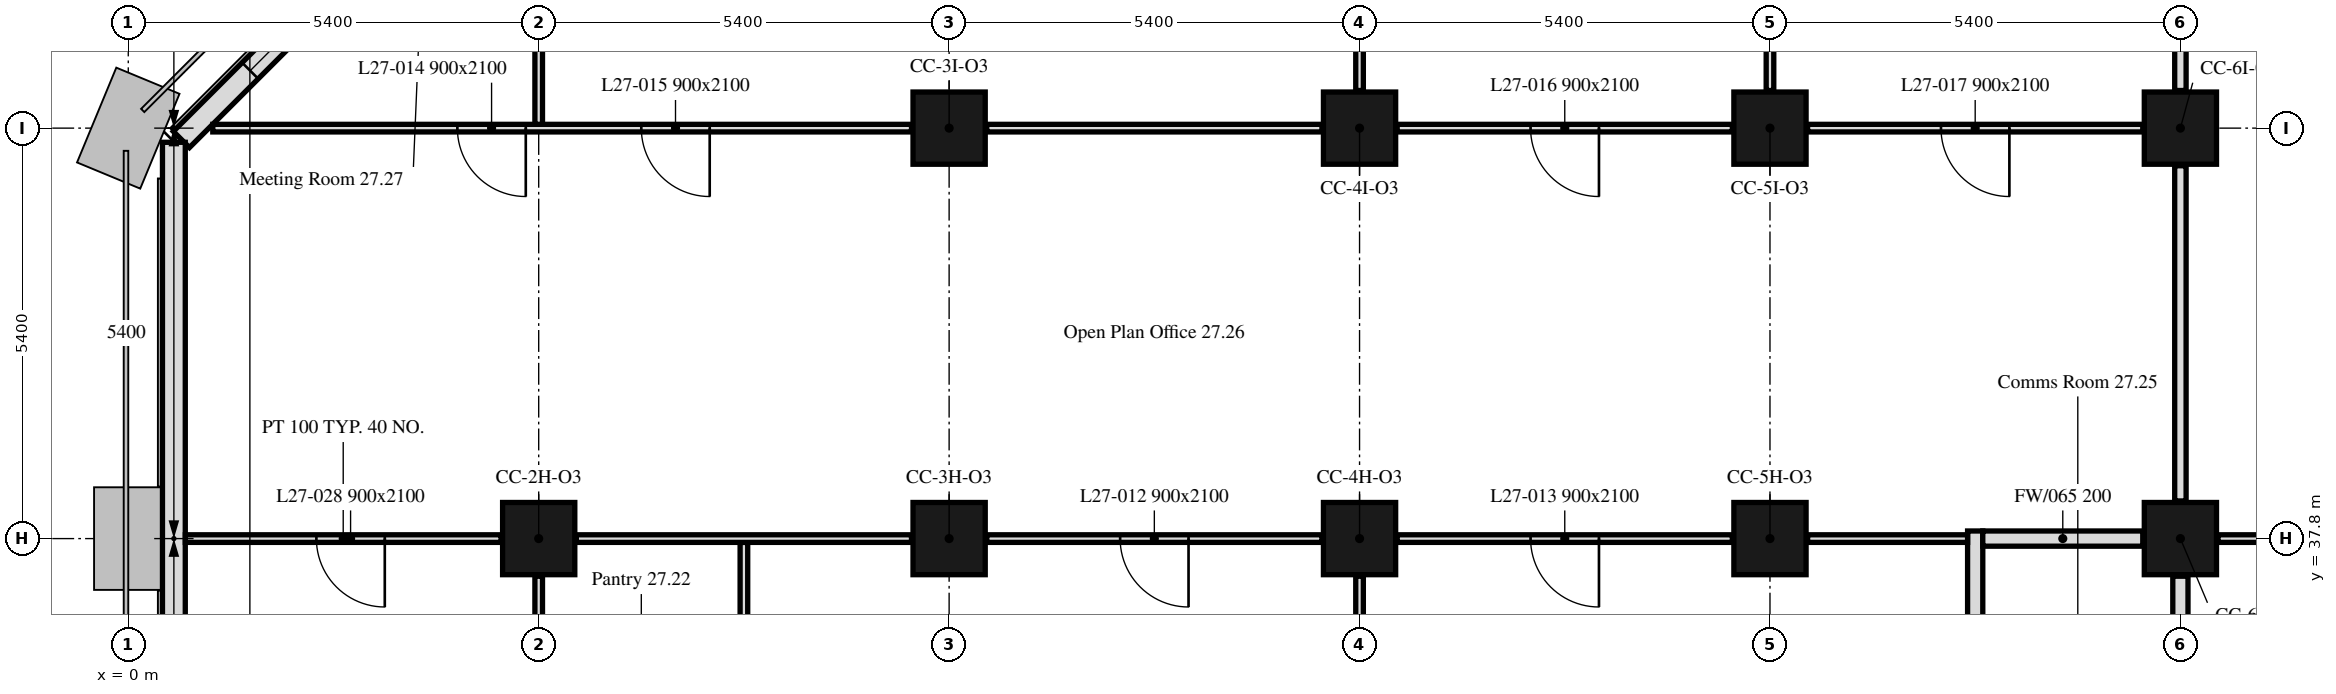
"""IFC4 building model, lengths in metres.
Left out: names, types, materials, properties, quantities, classifications, styles, units other than length and angle.
Written with IfcOpenShell. Run it as: python <this file> out.ifc"""

import sys

from ifc_helpers import new_model, si_unit, direction, frame, frame_2d, origin, origin_2d, place, context, subcontext, project, spatial, rectangle, extrude, element, fill, save


model = new_model("IFC4")
c1 = context("Model", 3, precision=1e-05, world=origin(), true_north=direction((0.0, 1.0)))
c2 = subcontext(c1, "Body", "Model", "MODEL_VIEW")
j1 = project(units=[si_unit("LENGTHUNIT", "METRE"), si_unit("PLANEANGLEUNIT", "RADIAN")], contexts=[c1])
p1 = place(None, origin())
s1 = spatial("IfcSite", under=j1, at=p1, CompositionType="ELEMENT")
p2 = place(p1, origin())
s2 = spatial("IfcBuilding", under=s1, at=p2, CompositionType="ELEMENT")
p3 = place(p2, frame((0.0, 0.0, 114.4)))
s3 = spatial("IfcBuildingStorey", under=s2, at=p3, CompositionType="ELEMENT", Elevation=114.4)
for number, where, z_axis, x_axis in (
    (1, (5.4, 37.8, 0.0), (0.0, 0.0, 1.0), (1.0, 0.0, 0.0)),
    (2, (10.8, 37.8, 0.0), (0.0, 0.0, 1.0), (1.0, 0.0, 0.0)),
    (3, (16.2, 37.8, 0.0), (0.0, 0.0, 1.0), (1.0, 0.0, 0.0)),
    (4, (21.6, 37.8, 0.0), (0.0, 0.0, 1.0), (1.0, 0.0, 0.0)),
    (5, (27.0, 37.8, 0.0), (0.0, 0.0, 1.0), (1.0, 0.0, 0.0)),
    (6, (10.8, 43.2, 0.0), (0.0, 0.0, 1.0), (1.0, 0.0, 0.0)),
    (7, (16.2, 43.2, 0.0), (0.0, 0.0, 1.0), (1.0, 0.0, 0.0)),
    (8, (21.6, 43.2, 0.0), (0.0, 0.0, 1.0), (1.0, 0.0, 0.0)),
    (9, (27.0, 43.2, 0.0), (0.0, 0.0, 1.0), (1.0, 0.0, 0.0)),
):
    element("IfcColumn", number, at=place(p3, frame(where, z_axis=z_axis, x_axis=x_axis)), inside=s3, PredefinedType="COLUMN", context=c2, shape_type="SweptSolid", body=[
        extrude(rectangle(XDim=0.95, YDim=0.95, at=origin_2d()), origin(), (0.0, 0.0, 1.0), 3.5),
    ])
p4 = place(p3, frame((5.55, 47.901, 0.0), z_axis=(0.0, 0.0, 1.0), x_axis=(-0.707106781187, -0.707106781187, 0.0)))
e10 = element("IfcWall", 10, at=p4, inside=s3, PredefinedType="SOLIDWALL", context=c2, shape_type="SweptSolid", body=[
    extrude(rectangle(XDim=6.86, YDim=0.3, at=frame_2d((3.43, 0.0))), origin(), (0.0, 0.0, 1.0), 3.5),
])
p5 = place(p4, frame((1.28, 0.0, 0.9)))
e11 = element("IfcOpeningElement", 11, at=p5, cuts=e10, PredefinedType="OPENING", context=c2, shape_type="SweptSolid", body=[
    extrude(rectangle(XDim=1.1, YDim=1.7, at=frame_2d((0.55, 0.85))), frame((0.0, 0.16, 0.0), z_axis=(0.0, -1.0, 0.0), x_axis=(1.0, 0.0, 0.0)), (0.0, 0.0, 1.0), 0.32),
])
p6 = place(p4, frame((4.48, 0.0, 0.9)))
e12 = element("IfcOpeningElement", 12, at=p6, cuts=e10, PredefinedType="OPENING", context=c2, shape_type="SweptSolid", body=[
    extrude(rectangle(XDim=1.1, YDim=1.7, at=frame_2d((0.55, 0.85))), frame((0.0, 0.16, 0.0), z_axis=(0.0, -1.0, 0.0), x_axis=(1.0, 0.0, 0.0)), (0.0, 0.0, 1.0), 0.32),
])
p7 = place(p3, frame((0.6, 43.014, 0.0), z_axis=(0.0, 0.0, 1.0), x_axis=(0.0, -1.0, 0.0)))
e13 = element("IfcWall", 13, at=p7, inside=s3, PredefinedType="SOLIDWALL", context=c2, shape_type="SweptSolid", body=[
    extrude(rectangle(XDim=32.027, YDim=0.3, at=frame_2d((16.014, 0.0))), origin(), (0.0, 0.0, 1.0), 3.5),
])
p8 = place(p7, frame((6.564, 0.0, 0.9)))
e14 = element("IfcOpeningElement", 14, at=p8, cuts=e13, PredefinedType="OPENING", context=c2, shape_type="SweptSolid", body=[
    extrude(rectangle(XDim=1.1, YDim=1.7, at=frame_2d((0.55, 0.85))), frame((0.0, 0.16, 0.0), z_axis=(0.0, -1.0, 0.0), x_axis=(1.0, 0.0, 0.0)), (0.0, 0.0, 1.0), 0.32),
])
p9 = place(p7, frame((8.164, 0.0, 0.9)))
e15 = element("IfcOpeningElement", 15, at=p9, cuts=e13, PredefinedType="OPENING", context=c2, shape_type="SweptSolid", body=[
    extrude(rectangle(XDim=1.1, YDim=1.7, at=frame_2d((0.55, 0.85))), frame((0.0, 0.16, 0.0), z_axis=(0.0, -1.0, 0.0), x_axis=(1.0, 0.0, 0.0)), (0.0, 0.0, 1.0), 0.32),
])
p10 = place(p7, frame((17.014, 0.0, 0.9)))
e16 = element("IfcOpeningElement", 16, at=p10, cuts=e13, PredefinedType="OPENING", context=c2, shape_type="SweptSolid", body=[
    extrude(rectangle(XDim=3.4, YDim=1.7, at=frame_2d((1.7, 0.85))), frame((0.0, 0.16, 0.0), z_axis=(0.0, -1.0, 0.0), x_axis=(1.0, 0.0, 0.0)), (0.0, 0.0, 1.0), 0.32),
])
p11 = place(p7, frame((28.164, 0.0, 0.9)))
e17 = element("IfcOpeningElement", 17, at=p11, cuts=e13, PredefinedType="OPENING", context=c2, shape_type="SweptSolid", body=[
    extrude(rectangle(XDim=1.1, YDim=1.7, at=frame_2d((0.55, 0.85))), frame((0.0, 0.16, 0.0), z_axis=(0.0, -1.0, 0.0), x_axis=(1.0, 0.0, 0.0)), (0.0, 0.0, 1.0), 0.32),
])
p12 = place(p7, frame((29.764, 0.0, 0.9)))
e18 = element("IfcOpeningElement", 18, at=p12, cuts=e13, PredefinedType="OPENING", context=c2, shape_type="SweptSolid", body=[
    extrude(rectangle(XDim=1.1, YDim=1.7, at=frame_2d((0.55, 0.85))), frame((0.0, 0.16, 0.0), z_axis=(0.0, -1.0, 0.0), x_axis=(1.0, 0.0, 0.0)), (0.0, 0.0, 1.0), 0.32),
])
p13 = place(p3, frame((4.905, 37.8, 0.0), z_axis=(0.0, 0.0, 1.0), x_axis=(-1.0, 0.0, 0.0)))
e19 = element("IfcWall", 19, at=p13, inside=s3, PredefinedType="PARTITIONING", context=c2, shape_type="SweptSolid", body=[
    extrude(rectangle(XDim=4.154, YDim=0.1, at=frame_2d((2.077, 0.0))), origin(), (0.0, 0.0, 1.0), 2.75),
])
p14 = place(p13, frame((1.53, 0.0, 0.0)))
e20 = element("IfcOpeningElement", 20, at=p14, cuts=e19, PredefinedType="OPENING", context=c2, shape_type="SweptSolid", body=[
    extrude(rectangle(XDim=0.9, YDim=2.1, at=frame_2d((0.45, 1.05))), frame((0.0, 0.05, 0.0), z_axis=(0.0, -1.0, 0.0), x_axis=(1.0, 0.0, 0.0)), (0.0, 0.0, 1.0), 0.1),
])
p15 = place(p3, frame((5.4, 35.175, 0.0), z_axis=(0.0, 0.0, 1.0), x_axis=(0.0, 1.0, 0.0)))
e21 = element("IfcWall", 21, at=p15, inside=s3, PredefinedType="PARTITIONING", context=c2, shape_type="SweptSolid", body=[
    extrude(rectangle(XDim=2.13, YDim=0.1, at=frame_2d((1.065, 0.0))), origin(), (0.0, 0.0, 1.0), 3.5),
])
p16 = place(p3, frame((8.1, 35.175, 0.0), z_axis=(0.0, 0.0, 1.0), x_axis=(0.0, 1.0, 0.0)))
e22 = element("IfcWall", 22, at=p16, inside=s3, PredefinedType="PARTITIONING", context=c2, shape_type="SweptSolid", body=[
    extrude(rectangle(XDim=2.575, YDim=0.1, at=frame_2d((1.288, 0.0))), origin(), (0.0, 0.0, 1.0), 3.5),
])
p17 = place(p3, frame((16.2, 35.175, 0.0), z_axis=(0.0, 0.0, 1.0), x_axis=(0.0, 1.0, 0.0)))
e23 = element("IfcWall", 23, at=p17, inside=s3, PredefinedType="PARTITIONING", context=c2, shape_type="SweptSolid", body=[
    extrude(rectangle(XDim=2.13, YDim=0.1, at=frame_2d((1.065, 0.0))), origin(), (0.0, 0.0, 1.0), 2.75),
])
p18 = place(p3, frame((15.705, 37.8, 0.0), z_axis=(0.0, 0.0, 1.0), x_axis=(-1.0, 0.0, 0.0)))
e24 = element("IfcWall", 24, at=p18, inside=s3, PredefinedType="PARTITIONING", context=c2, shape_type="SweptSolid", body=[
    extrude(rectangle(XDim=4.41, YDim=0.1, at=frame_2d((2.205, 0.0))), origin(), (0.0, 0.0, 1.0), 2.75),
])
p19 = place(p18, frame((1.755, 0.0, 0.0)))
e25 = element("IfcOpeningElement", 25, at=p19, cuts=e24, PredefinedType="OPENING", context=c2, shape_type="SweptSolid", body=[
    extrude(rectangle(XDim=0.9, YDim=2.1, at=frame_2d((0.45, 1.05))), frame((0.0, 0.05, 0.0), z_axis=(0.0, -1.0, 0.0), x_axis=(1.0, 0.0, 0.0)), (0.0, 0.0, 1.0), 0.1),
])
p20 = place(p3, frame((10.305, 37.8, 0.0), z_axis=(0.0, 0.0, 1.0), x_axis=(-1.0, 0.0, 0.0)))
e26 = element("IfcWall", 26, at=p20, inside=s3, PredefinedType="PARTITIONING", context=c2, shape_type="SweptSolid", body=[
    extrude(rectangle(XDim=4.41, YDim=0.1, at=frame_2d((2.205, 0.0))), origin(), (0.0, 0.0, 1.0), 2.75),
])
p21 = place(p3, frame((24.3, 35.2, 0.0), z_axis=(0.0, 0.0, 1.0), x_axis=(0.0, 1.0, 0.0)))
e27 = element("IfcWall", 27, at=p21, inside=s3, PredefinedType="PARTITIONING", context=c2, shape_type="SweptSolid", body=[
    extrude(rectangle(XDim=2.7, YDim=0.2, at=frame_2d((1.35, 0.0))), origin(), (0.0, 0.0, 1.0), 3.5),
])
p22 = place(p3, frame((24.2, 37.8, 0.0), z_axis=(0.0, 0.0, 1.0), x_axis=(-1.0, 0.0, 0.0)))
e28 = element("IfcWall", 28, at=p22, inside=s3, PredefinedType="PARTITIONING", context=c2, shape_type="SweptSolid", body=[
    extrude(rectangle(XDim=2.105, YDim=0.1, at=frame_2d((1.052, 0.0))), origin(), (0.0, 0.0, 1.0), 3.5),
])
p23 = place(p3, frame((21.105, 37.8, 0.0), z_axis=(0.0, 0.0, 1.0), x_axis=(-1.0, 0.0, 0.0)))
e29 = element("IfcWall", 29, at=p23, inside=s3, PredefinedType="PARTITIONING", context=c2, shape_type="SweptSolid", body=[
    extrude(rectangle(XDim=4.41, YDim=0.1, at=frame_2d((2.205, 0.0))), origin(), (0.0, 0.0, 1.0), 3.5),
])
p24 = place(p23, frame((1.755, 0.0, 0.0)))
e30 = element("IfcOpeningElement", 30, at=p24, cuts=e29, PredefinedType="OPENING", context=c2, shape_type="SweptSolid", body=[
    extrude(rectangle(XDim=0.9, YDim=2.1, at=frame_2d((0.45, 1.05))), frame((0.0, 0.05, 0.0), z_axis=(0.0, -1.0, 0.0), x_axis=(1.0, 0.0, 0.0)), (0.0, 0.0, 1.0), 0.1),
])
p25 = place(p3, frame((27.0, 35.2, 0.0), z_axis=(0.0, 0.0, 1.0), x_axis=(0.0, 1.0, 0.0)))
e31 = element("IfcWall", 31, at=p25, inside=s3, PredefinedType="PARTITIONING", context=c2, shape_type="SweptSolid", body=[
    extrude(rectangle(XDim=2.105, YDim=0.2, at=frame_2d((1.052, 0.0))), origin(), (0.0, 0.0, 1.0), 2.75),
])
p26 = place(p3, frame((26.505, 37.8, 0.0), z_axis=(0.0, 0.0, 1.0), x_axis=(-1.0, 0.0, 0.0)))
e32 = element("IfcWall", 32, at=p26, inside=s3, PredefinedType="PARTITIONING", context=c2, shape_type="SweptSolid", body=[
    extrude(rectangle(XDim=2.105, YDim=0.2, at=frame_2d((1.052, 0.0))), origin(), (0.0, 0.0, 1.0), 3.5),
])
p27 = place(p3, frame((26.505, 43.2, 0.0), z_axis=(0.0, 0.0, 1.0), x_axis=(-1.0, 0.0, 0.0)))
e33 = element("IfcWall", 33, at=p27, inside=s3, PredefinedType="PARTITIONING", context=c2, shape_type="SweptSolid", body=[
    extrude(rectangle(XDim=4.41, YDim=0.1, at=frame_2d((2.205, 0.0))), origin(), (0.0, 0.0, 1.0), 3.5),
])
p28 = place(p27, frame((1.755, 0.0, 0.0)))
e34 = element("IfcOpeningElement", 34, at=p28, cuts=e33, PredefinedType="OPENING", context=c2, shape_type="SweptSolid", body=[
    extrude(rectangle(XDim=0.9, YDim=2.1, at=frame_2d((0.45, 1.05))), frame((0.0, 0.05, 0.0), z_axis=(0.0, -1.0, 0.0), x_axis=(1.0, 0.0, 0.0)), (0.0, 0.0, 1.0), 0.1),
])
p29 = place(p3, frame((21.105, 43.2, 0.0), z_axis=(0.0, 0.0, 1.0), x_axis=(-1.0, 0.0, 0.0)))
e35 = element("IfcWall", 35, at=p29, inside=s3, PredefinedType="PARTITIONING", context=c2, shape_type="SweptSolid", body=[
    extrude(rectangle(XDim=4.41, YDim=0.1, at=frame_2d((2.205, 0.0))), origin(), (0.0, 0.0, 1.0), 3.5),
])
p30 = place(p29, frame((1.755, 0.0, 0.0)))
e36 = element("IfcOpeningElement", 36, at=p30, cuts=e35, PredefinedType="OPENING", context=c2, shape_type="SweptSolid", body=[
    extrude(rectangle(XDim=0.9, YDim=2.1, at=frame_2d((0.45, 1.05))), frame((0.0, 0.05, 0.0), z_axis=(0.0, -1.0, 0.0), x_axis=(1.0, 0.0, 0.0)), (0.0, 0.0, 1.0), 0.1),
])
p31 = place(p3, frame((15.705, 43.2, 0.0), z_axis=(0.0, 0.0, 1.0), x_axis=(-1.0, 0.0, 0.0)))
e37 = element("IfcWall", 37, at=p31, inside=s3, PredefinedType="PARTITIONING", context=c2, shape_type="SweptSolid", body=[
    extrude(rectangle(XDim=4.41, YDim=0.1, at=frame_2d((2.205, 0.0))), origin(), (0.0, 0.0, 1.0), 3.5),
])
p32 = place(p3, frame((10.305, 43.2, 0.0), z_axis=(0.0, 0.0, 1.0), x_axis=(-1.0, 0.0, 0.0)))
e38 = element("IfcWall", 38, at=p32, inside=s3, PredefinedType="PARTITIONING", context=c2, shape_type="SweptSolid", body=[
    extrude(rectangle(XDim=9.193, YDim=0.1, at=frame_2d((4.596, 0.0))), origin(), (0.0, 0.0, 1.0), 3.5),
])
p33 = place(p32, frame((5.075, 0.0, 0.0)))
e39 = element("IfcOpeningElement", 39, at=p33, cuts=e38, PredefinedType="OPENING", context=c2, shape_type="SweptSolid", body=[
    extrude(rectangle(XDim=0.9, YDim=2.1, at=frame_2d((0.45, 1.05))), frame((0.0, 0.05, 0.0), z_axis=(0.0, -1.0, 0.0), x_axis=(1.0, 0.0, 0.0)), (0.0, 0.0, 1.0), 0.1),
])
p34 = place(p32, frame((2.655, 0.0, 0.0)))
e40 = element("IfcOpeningElement", 40, at=p34, cuts=e38, PredefinedType="OPENING", context=c2, shape_type="SweptSolid", body=[
    extrude(rectangle(XDim=0.9, YDim=2.1, at=frame_2d((0.45, 1.05))), frame((0.0, 0.05, 0.0), z_axis=(0.0, -1.0, 0.0), x_axis=(1.0, 0.0, 0.0)), (0.0, 0.0, 1.0), 0.1),
])
p35 = place(p3, frame((27.0, 38.295, 0.0), z_axis=(0.0, 0.0, 1.0), x_axis=(0.0, 1.0, 0.0)))
e41 = element("IfcWall", 41, at=p35, inside=s3, PredefinedType="PARTITIONING", context=c2, shape_type="SweptSolid", body=[
    extrude(rectangle(XDim=4.41, YDim=0.15, at=frame_2d((2.205, 0.0))), origin(), (0.0, 0.0, 1.0), 2.75),
])
p36 = place(p3, frame((5.4, 43.25, 0.0), z_axis=(0.0, 0.0, 1.0), x_axis=(0.0, 1.0, 0.0)))
e42 = element("IfcWall", 42, at=p36, inside=s3, PredefinedType="PARTITIONING", context=c2, shape_type="SweptSolid", body=[
    extrude(rectangle(XDim=4.238, YDim=0.1, at=frame_2d((2.119, 0.0))), origin(), (0.0, 0.0, 1.0), 3.5),
])
for number, where, z_axis, x_axis in (
    (43, (16.2, 43.695, 0.0), (0.0, 0.0, 1.0), (0.0, 1.0, 0.0)),
    (44, (21.6, 43.695, 0.0), (0.0, 0.0, 1.0), (0.0, 1.0, 0.0)),
):
    element("IfcWall", number, at=place(p3, frame(where, z_axis=z_axis, x_axis=x_axis)), inside=s3, PredefinedType="PARTITIONING", context=c2, shape_type="SweptSolid", body=[
        extrude(rectangle(XDim=4.154, YDim=0.1, at=frame_2d((2.077, 0.0))), origin(), (0.0, 0.0, 1.0), 2.75),
    ])
p37 = place(p3, frame((27.0, 43.695, 0.0), z_axis=(0.0, 0.0, 1.0), x_axis=(0.0, 1.0, 0.0)))
e45 = element("IfcWall", 45, at=p37, inside=s3, PredefinedType="PARTITIONING", context=c2, shape_type="SweptSolid", body=[
    extrude(rectangle(XDim=4.154, YDim=0.15, at=frame_2d((2.077, 0.0))), origin(), (0.0, 0.0, 1.0), 2.75),
])
p38 = place(p3, frame((31.905, 37.8, 0.0), z_axis=(0.0, 0.0, 1.0), x_axis=(-1.0, 0.0, 0.0)))
e46 = element("IfcWall", 46, at=p38, inside=s3, PredefinedType="PARTITIONING", context=c2, shape_type="SweptSolid", body=[
    extrude(rectangle(XDim=4.41, YDim=0.1, at=frame_2d((2.205, 0.0))), origin(), (0.0, 0.0, 1.0), 3.5),
])
p39 = place(p38, frame((1.755, 0.0, 0.0)))
e47 = element("IfcOpeningElement", 47, at=p39, cuts=e46, PredefinedType="OPENING", context=c2, shape_type="SweptSolid", body=[
    extrude(rectangle(XDim=0.9, YDim=2.1, at=frame_2d((0.45, 1.05))), frame((0.0, 0.05, 0.0), z_axis=(0.0, -1.0, 0.0), x_axis=(1.0, 0.0, 0.0)), (0.0, 0.0, 1.0), 0.1),
])
p40 = place(p6, origin())
e48 = element("IfcWindow", 48, at=p40, inside=s3, PartitioningType="SINGLE_PANEL", PredefinedType="WINDOW", context=c2, shape_type="SweptSolid", body=[
    extrude(rectangle(XDim=1.1, YDim=1.7, at=frame_2d((0.55, 0.85))), frame((0.0, 0.03, 0.0), z_axis=(0.0, -1.0, 0.0), x_axis=(1.0, 0.0, 0.0)), (0.0, 0.0, 1.0), 0.06),
])
fill(e12, e48)
p41 = place(p19, origin())
e49 = element("IfcDoor", 49, at=p41, inside=s3, OperationType="SINGLE_SWING_LEFT", PredefinedType="DOOR", context=c2, shape_type="SweptSolid", body=[
    extrude(rectangle(XDim=0.9, YDim=2.1, at=frame_2d((0.45, 1.05))), frame((0.0, 0.025, 0.0), z_axis=(0.0, -1.0, 0.0), x_axis=(1.0, 0.0, 0.0)), (0.0, 0.0, 1.0), 0.05),
])
fill(e25, e49)
p42 = place(p24, origin())
e50 = element("IfcDoor", 50, at=p42, inside=s3, OperationType="SINGLE_SWING_RIGHT", PredefinedType="DOOR", context=c2, shape_type="SweptSolid", body=[
    extrude(rectangle(XDim=0.9, YDim=2.1, at=frame_2d((0.45, 1.05))), frame((0.0, 0.025, 0.0), z_axis=(0.0, -1.0, 0.0), x_axis=(1.0, 0.0, 0.0)), (0.0, 0.0, 1.0), 0.05),
])
fill(e30, e50)
p43 = place(p33, origin())
e51 = element("IfcDoor", 51, at=p43, inside=s3, OperationType="SINGLE_SWING_LEFT", PredefinedType="DOOR", context=c2, shape_type="SweptSolid", body=[
    extrude(rectangle(XDim=0.9, YDim=2.1, at=frame_2d((0.45, 1.05))), frame((0.0, 0.025, 0.0), z_axis=(0.0, -1.0, 0.0), x_axis=(1.0, 0.0, 0.0)), (0.0, 0.0, 1.0), 0.05),
])
fill(e39, e51)
p44 = place(p34, origin())
e52 = element("IfcDoor", 52, at=p44, inside=s3, OperationType="SINGLE_SWING_LEFT", PredefinedType="DOOR", context=c2, shape_type="SweptSolid", body=[
    extrude(rectangle(XDim=0.9, YDim=2.1, at=frame_2d((0.45, 1.05))), frame((0.0, 0.025, 0.0), z_axis=(0.0, -1.0, 0.0), x_axis=(1.0, 0.0, 0.0)), (0.0, 0.0, 1.0), 0.05),
])
fill(e40, e52)
p45 = place(p30, origin())
e53 = element("IfcDoor", 53, at=p45, inside=s3, OperationType="SINGLE_SWING_LEFT", PredefinedType="DOOR", context=c2, shape_type="SweptSolid", body=[
    extrude(rectangle(XDim=0.9, YDim=2.1, at=frame_2d((0.45, 1.05))), frame((0.0, 0.025, 0.0), z_axis=(0.0, -1.0, 0.0), x_axis=(1.0, 0.0, 0.0)), (0.0, 0.0, 1.0), 0.05),
])
fill(e36, e53)
p46 = place(p28, origin())
e54 = element("IfcDoor", 54, at=p46, inside=s3, OperationType="SINGLE_SWING_LEFT", PredefinedType="DOOR", context=c2, shape_type="SweptSolid", body=[
    extrude(rectangle(XDim=0.9, YDim=2.1, at=frame_2d((0.45, 1.05))), frame((0.0, 0.025, 0.0), z_axis=(0.0, -1.0, 0.0), x_axis=(1.0, 0.0, 0.0)), (0.0, 0.0, 1.0), 0.05),
])
fill(e34, e54)
p47 = place(p14, origin())
e55 = element("IfcDoor", 55, at=p47, inside=s3, OperationType="SINGLE_SWING_RIGHT", PredefinedType="DOOR", context=c2, shape_type="SweptSolid", body=[
    extrude(rectangle(XDim=0.9, YDim=2.1, at=frame_2d((0.45, 1.05))), frame((0.0, 0.025, 0.0), z_axis=(0.0, -1.0, 0.0), x_axis=(1.0, 0.0, 0.0)), (0.0, 0.0, 1.0), 0.05),
])
fill(e20, e55)
save(model, sys.argv[1])
